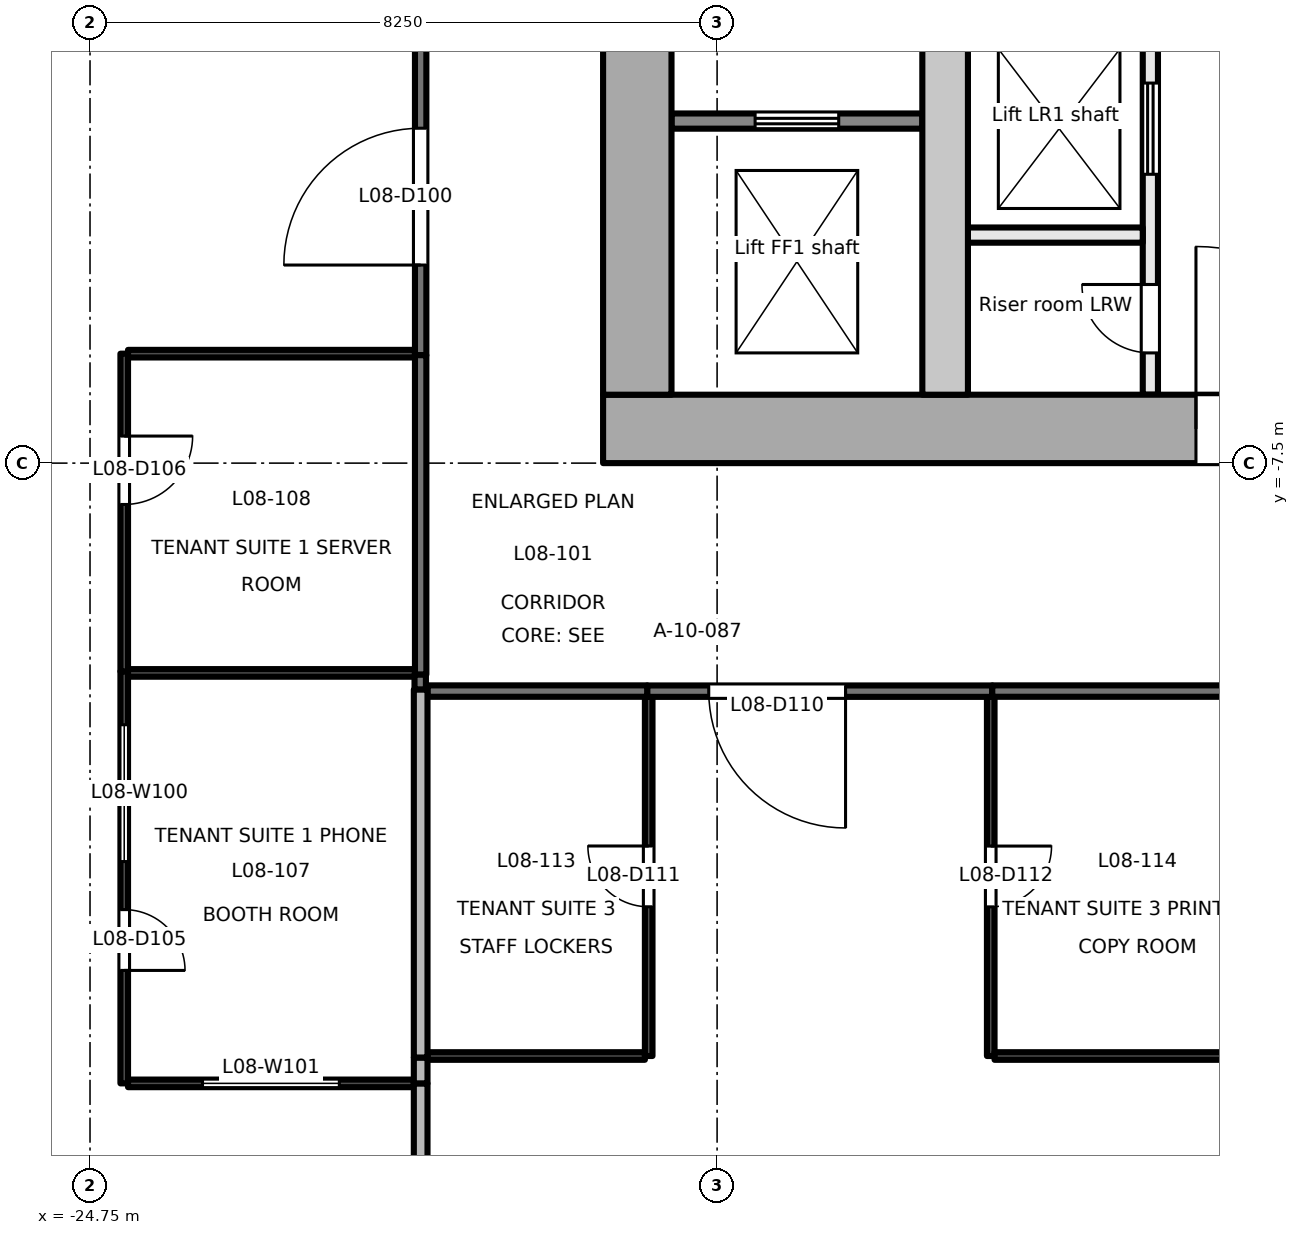
"""IFC4 building model, lengths in metres.
Left out: names, types, materials, properties, quantities, classifications, styles, units other than length and angle.
Written with IfcOpenShell. Run it as: python <this file> out.ifc"""

import sys

from ifc_helpers import new_model, si_unit, direction, frame, frame_2d, origin, place, context, subcontext, project, spatial, rectangle, extrude, element, fill, save


model = new_model("IFC4")
c1 = context("Model", 3, precision=1e-05, world=origin(), true_north=direction((0.0, 1.0)))
c2 = subcontext(c1, "Body", "Model", "MODEL_VIEW")
j1 = project(units=[si_unit("LENGTHUNIT", "METRE"), si_unit("PLANEANGLEUNIT", "RADIAN")], contexts=[c1])
p1 = place(None, origin())
s1 = spatial("IfcSite", under=j1, at=p1, CompositionType="ELEMENT")
p2 = place(p1, origin())
s2 = spatial("IfcBuilding", under=s1, at=p2, CompositionType="ELEMENT")
p3 = place(p2, frame((0.0, 0.0, 40.6)))
s3 = spatial("IfcBuildingStorey", under=s2, at=p3, CompositionType="ELEMENT", Elevation=40.6)
p4 = place(p3, frame((-18.0, -7.05, -0.2), z_axis=(0.0, 0.0, 1.0), x_axis=(1.0, 0.0, 0.0)))
e1 = element("IfcWall", 1, at=p4, inside=s3, PredefinedType="SHEAR", context=c2, shape_type="SweptSolid", body=[
    extrude(rectangle(XDim=36.0, YDim=0.9, at=frame_2d((18.0, 0.0))), origin(), (0.0, 0.0, 1.0), 4.1),
])
p5 = place(p4, frame((7.8, 0.0, 0.2)))
e2 = element("IfcOpeningElement", 2, at=p5, cuts=e1, PredefinedType="OPENING", context=c2, shape_type="SweptSolid", body=[
    extrude(rectangle(XDim=2.4, YDim=2.1, at=frame_2d((1.2, 1.05))), frame((0.0, 0.46, 0.0), z_axis=(0.0, -1.0, 0.0), x_axis=(1.0, 0.0, 0.0)), (0.0, 0.0, 1.0), 0.921),
])
p6 = place(p4, frame((17.4, 0.0, 0.2)))
e3 = element("IfcOpeningElement", 3, at=p6, cuts=e1, PredefinedType="OPENING", context=c2, shape_type="SweptSolid", body=[
    extrude(rectangle(XDim=1.2, YDim=2.1, at=frame_2d((0.6, 1.05))), frame((0.0, 0.46, 0.0), z_axis=(0.0, -1.0, 0.0), x_axis=(1.0, 0.0, 0.0)), (0.0, 0.0, 1.0), 0.921),
])
p7 = place(p4, frame((26.1, 0.0, 0.2)))
e4 = element("IfcOpeningElement", 4, at=p7, cuts=e1, PredefinedType="OPENING", context=c2, shape_type="SweptSolid", body=[
    extrude(rectangle(XDim=2.4, YDim=2.1, at=frame_2d((1.2, 1.05))), frame((0.0, 0.46, 0.0), z_axis=(0.0, -1.0, 0.0), x_axis=(1.0, 0.0, 0.0)), (0.0, 0.0, 1.0), 0.921),
])
p8 = place(p3, frame((-17.55, -6.6, -0.2), z_axis=(0.0, 0.0, 1.0), x_axis=(0.0, 1.0, 0.0)))
e5 = element("IfcWall", 5, at=p8, inside=s3, PredefinedType="SHEAR", context=c2, shape_type="SweptSolid", body=[
    extrude(rectangle(XDim=13.2, YDim=0.9, at=frame_2d((6.6, 0.0))), origin(), (0.0, 0.0, 1.0), 4.1),
])
p9 = place(p8, frame((4.55, 0.0, 0.2)))
e6 = element("IfcOpeningElement", 6, at=p9, cuts=e5, PredefinedType="OPENING", context=c2, shape_type="SweptSolid", body=[
    extrude(rectangle(XDim=1.2, YDim=2.1, at=frame_2d((0.6, 1.05))), frame((0.0, 0.46, 0.0), z_axis=(0.0, -1.0, 0.0), x_axis=(1.0, 0.0, 0.0)), (0.0, 0.0, 1.0), 0.921),
])
p10 = place(p3, frame((-13.5, -6.6, -0.2), z_axis=(0.0, 0.0, 1.0), x_axis=(0.0, 1.0, 0.0)))
e7 = element("IfcWall", 7, at=p10, inside=s3, PredefinedType="SHEAR", context=c2, shape_type="SweptSolid", body=[
    extrude(rectangle(XDim=13.2, YDim=0.6, at=frame_2d((6.6, 0.0))), origin(), (0.0, 0.0, 1.0), 4.1),
])
p11 = place(p3, frame((-17.1, -3.0, 0.0), z_axis=(0.0, 0.0, 1.0), x_axis=(1.0, 0.0, 0.0)))
e8 = element("IfcWall", 8, at=p11, inside=s3, PredefinedType="PARTITIONING", context=c2, shape_type="SweptSolid", body=[
    extrude(rectangle(XDim=3.3, YDim=0.2, at=frame_2d((1.65, 0.0))), origin(), (0.0, 0.0, 1.0), 3.9),
])
p12 = place(p11, frame((1.1, 0.0, 0.0)))
e9 = element("IfcOpeningElement", 9, at=p12, cuts=e8, PredefinedType="OPENING", context=c2, shape_type="SweptSolid", body=[
    extrude(rectangle(XDim=1.1, YDim=2.1, at=frame_2d((0.55, 1.05))), frame((0.0, 0.111, 0.0), z_axis=(0.0, -1.0, 0.0), x_axis=(1.0, 0.0, 0.0)), (0.0, 0.0, 1.0), 0.221),
])
p13 = place(p3, frame((-10.8, -6.6, 0.0), z_axis=(0.0, 0.0, 1.0), x_axis=(0.0, 1.0, 0.0)))
e10 = element("IfcWall", 10, at=p13, inside=s3, PredefinedType="PARTITIONING", context=c2, shape_type="SweptSolid", body=[
    extrude(rectangle(XDim=13.2, YDim=0.2, at=frame_2d((6.6, 0.0))), origin(), (0.0, 0.0, 1.0), 3.9),
])
p14 = place(p13, frame((0.55, 0.0, 0.0)))
e11 = element("IfcOpeningElement", 11, at=p14, cuts=e10, PredefinedType="OPENING", context=c2, shape_type="SweptSolid", body=[
    extrude(rectangle(XDim=0.9, YDim=2.1, at=frame_2d((0.45, 1.05))), frame((0.0, 0.111, 0.0), z_axis=(0.0, -1.0, 0.0), x_axis=(1.0, 0.0, 0.0)), (0.0, 0.0, 1.0), 0.221),
])
p15 = place(p13, frame((2.9, 0.0, 0.0)))
e12 = element("IfcOpeningElement", 12, at=p15, cuts=e10, PredefinedType="OPENING", context=c2, shape_type="SweptSolid", body=[
    extrude(rectangle(XDim=1.2, YDim=2.1, at=frame_2d((0.6, 1.05))), frame((0.0, 0.111, 0.0), z_axis=(0.0, -1.0, 0.0), x_axis=(1.0, 0.0, 0.0)), (0.0, 0.0, 1.0), 0.221),
])
p16 = place(p13, frame((5.7, 0.0, 0.0)))
e13 = element("IfcOpeningElement", 13, at=p16, cuts=e10, PredefinedType="OPENING", context=c2, shape_type="SweptSolid", body=[
    extrude(rectangle(XDim=1.2, YDim=2.1, at=frame_2d((0.6, 1.05))), frame((0.0, 0.111, 0.0), z_axis=(0.0, -1.0, 0.0), x_axis=(1.0, 0.0, 0.0)), (0.0, 0.0, 1.0), 0.221),
])
p17 = place(p13, frame((8.5, 0.0, 0.0)))
e14 = element("IfcOpeningElement", 14, at=p17, cuts=e10, PredefinedType="OPENING", context=c2, shape_type="SweptSolid", body=[
    extrude(rectangle(XDim=1.2, YDim=2.1, at=frame_2d((0.6, 1.05))), frame((0.0, 0.111, 0.0), z_axis=(0.0, -1.0, 0.0), x_axis=(1.0, 0.0, 0.0)), (0.0, 0.0, 1.0), 0.221),
])
p18 = place(p13, frame((11.3, 0.0, 0.0)))
e15 = element("IfcOpeningElement", 15, at=p18, cuts=e10, PredefinedType="OPENING", context=c2, shape_type="SweptSolid", body=[
    extrude(rectangle(XDim=1.2, YDim=2.1, at=frame_2d((0.6, 1.05))), frame((0.0, 0.111, 0.0), z_axis=(0.0, -1.0, 0.0), x_axis=(1.0, 0.0, 0.0)), (0.0, 0.0, 1.0), 0.221),
])
p19 = place(p3, frame((-13.2, -4.5, 0.0), z_axis=(0.0, 0.0, 1.0), x_axis=(1.0, 0.0, 0.0)))
e16 = element("IfcWall", 16, at=p19, inside=s3, PredefinedType="PARTITIONING", context=c2, shape_type="SweptSolid", body=[
    extrude(rectangle(XDim=2.3, YDim=0.2, at=frame_2d((1.15, 0.0))), origin(), (0.0, 0.0, 1.0), 3.9),
])
p20 = place(p3, frame((-20.4, -6.08, 0.0), z_axis=(0.0, 0.0, 1.0), x_axis=(0.0, 1.0, 0.0)))
e17 = element("IfcWall", 17, at=p20, inside=s3, PredefinedType="PARTITIONING", context=c2, shape_type="SweptSolid", body=[
    extrude(rectangle(XDim=4.172, YDim=0.15, at=frame_2d((2.086, 0.0))), origin(), (0.0, 0.0, 1.0), 3.3),
])
p21 = place(p20, frame((1.186, 0.0, 0.0)))
e18 = element("IfcOpeningElement", 18, at=p21, cuts=e17, PredefinedType="OPENING", context=c2, shape_type="SweptSolid", body=[
    extrude(rectangle(XDim=1.8, YDim=2.1, at=frame_2d((0.9, 1.05))), frame((0.0, 0.085, 0.0), z_axis=(0.0, -1.0, 0.0), x_axis=(1.0, 0.0, 0.0)), (0.0, 0.0, 1.0), 0.171),
])
p22 = place(p3, frame((-20.406, -10.48, 0.0), z_axis=(0.0, 0.0, 1.0), x_axis=(0.0, 1.0, 0.0)))
e19 = element("IfcWall", 19, at=p22, inside=s3, PredefinedType="PARTITIONING", context=c2, shape_type="SweptSolid", body=[
    extrude(rectangle(XDim=0.2, YDim=0.15, at=frame_2d((0.1, 0.0))), origin(), (0.0, 0.0, 1.0), 3.9),
])
p23 = place(p3, frame((-20.4, -10.28, 0.0), z_axis=(0.0, 0.0, 1.0), x_axis=(0.0, 1.0, 0.0)))
e20 = element("IfcWall", 20, at=p23, inside=s3, PredefinedType="PARTITIONING", context=c2, shape_type="SweptSolid", body=[
    extrude(rectangle(XDim=4.2, YDim=0.15, at=frame_2d((2.1, 0.0))), origin(), (0.0, 0.0, 1.0), 3.3),
])
p24 = place(p3, frame((-12.88, -10.5, 0.0), z_axis=(0.0, 0.0, 1.0), x_axis=(-1.0, 0.0, 0.0)))
e21 = element("IfcWall", 21, at=p24, inside=s3, PredefinedType="PARTITIONING", context=c2, shape_type="SweptSolid", body=[
    extrude(rectangle(XDim=4.54, YDim=0.15, at=frame_2d((2.27, 0.0))), origin(), (0.0, 0.0, 1.0), 2.9),
])
p25 = place(p24, frame((1.93, 0.0, 0.0)))
e22 = element("IfcOpeningElement", 22, at=p25, cuts=e21, PredefinedType="OPENING", context=c2, shape_type="SweptSolid", body=[
    extrude(rectangle(XDim=1.8, YDim=2.1, at=frame_2d((0.9, 1.05))), frame((0.0, 0.085, 0.0), z_axis=(0.0, -1.0, 0.0), x_axis=(1.0, 0.0, 0.0)), (0.0, 0.0, 1.0), 0.171),
])
p26 = place(p3, frame((-17.42, -10.499, 0.0), z_axis=(0.0, 0.0, 1.0), x_axis=(-1.0, 0.0, 0.0)))
e23 = element("IfcWall", 23, at=p26, inside=s3, PredefinedType="PARTITIONING", context=c2, shape_type="SweptSolid", body=[
    extrude(rectangle(XDim=2.89, YDim=0.15, at=frame_2d((1.445, 0.0))), origin(), (0.0, 0.0, 1.0), 2.5),
])
p27 = place(p3, frame((-9.09, -10.499, 0.0), z_axis=(0.0, 0.0, 1.0), x_axis=(-1.0, 0.0, 0.0)))
e24 = element("IfcWall", 24, at=p27, inside=s3, PredefinedType="PARTITIONING", context=c2, shape_type="SweptSolid", body=[
    extrude(rectangle(XDim=3.79, YDim=0.15, at=frame_2d((1.895, 0.0))), origin(), (0.0, 0.0, 1.0), 2.9),
])
p28 = place(p3, frame((-24.3, -10.24, 0.0), z_axis=(0.0, 0.0, 1.0), x_axis=(0.0, -1.0, 0.0)))
e25 = element("IfcWall", 25, at=p28, inside=s3, PredefinedType="PARTITIONING", context=c2, shape_type="SweptSolid", body=[
    extrude(rectangle(XDim=5.42, YDim=0.1, at=frame_2d((2.71, 0.0))), origin(), (0.0, 0.0, 1.0), 3.3),
])
p29 = place(p28, frame((3.134, 0.0, 0.0)))
e26 = element("IfcOpeningElement", 26, at=p29, cuts=e25, PredefinedType="OPENING", context=c2, shape_type="SweptSolid", body=[
    extrude(rectangle(XDim=0.8, YDim=2.1, at=frame_2d((0.4, 1.05))), frame((0.0, 0.061, 0.0), z_axis=(0.0, -1.0, 0.0), x_axis=(1.0, 0.0, 0.0)), (0.0, 0.0, 1.0), 0.121),
])
p30 = place(p28, frame((0.702, 0.0, 0.9)))
e27 = element("IfcOpeningElement", 27, at=p30, cuts=e25, PredefinedType="OPENING", context=c2, shape_type="SweptSolid", body=[
    extrude(rectangle(XDim=1.8, YDim=1.2, at=frame_2d((0.9, 0.6))), frame((0.0, 0.061, 0.0), z_axis=(0.0, -1.0, 0.0), x_axis=(1.0, 0.0, 0.0)), (0.0, 0.0, 1.0), 0.121),
])
p31 = place(p3, frame((-24.25, -15.66, 0.0), z_axis=(0.0, 0.0, 1.0), x_axis=(1.0, 0.0, 0.0)))
e28 = element("IfcWall", 28, at=p31, inside=s3, PredefinedType="PARTITIONING", context=c2, shape_type="SweptSolid", body=[
    extrude(rectangle(XDim=3.76, YDim=0.1, at=frame_2d((1.88, 0.0))), origin(), (0.0, 0.0, 1.0), 3.9),
])
p32 = place(p31, frame((0.98, 0.0, 0.9)))
e29 = element("IfcOpeningElement", 29, at=p32, cuts=e28, PredefinedType="OPENING", context=c2, shape_type="SweptSolid", body=[
    extrude(rectangle(XDim=1.8, YDim=1.2, at=frame_2d((0.9, 0.6))), frame((0.0, 0.061, 0.0), z_axis=(0.0, -1.0, 0.0), x_axis=(1.0, 0.0, 0.0)), (0.0, 0.0, 1.0), 0.121),
])
p33 = place(p3, frame((-24.3, -6.06, 0.0), z_axis=(0.0, 0.0, 1.0), x_axis=(0.0, -1.0, 0.0)))
e30 = element("IfcWall", 30, at=p33, inside=s3, PredefinedType="PARTITIONING", context=c2, shape_type="SweptSolid", body=[
    extrude(rectangle(XDim=4.18, YDim=0.1, at=frame_2d((2.09, 0.0))), origin(), (0.0, 0.0, 1.0), 3.3),
])
p34 = place(p33, frame((1.084, 0.0, 0.0)))
e31 = element("IfcOpeningElement", 31, at=p34, cuts=e30, PredefinedType="OPENING", context=c2, shape_type="SweptSolid", body=[
    extrude(rectangle(XDim=0.9, YDim=2.1, at=frame_2d((0.45, 1.05))), frame((0.0, 0.061, 0.0), z_axis=(0.0, -1.0, 0.0), x_axis=(1.0, 0.0, 0.0)), (0.0, 0.0, 1.0), 0.121),
])
p35 = place(p3, frame((-20.475, -6.06, 0.0), z_axis=(0.0, 0.0, 1.0), x_axis=(-1.0, 0.0, 0.0)))
e32 = element("IfcWall", 32, at=p35, inside=s3, PredefinedType="PARTITIONING", context=c2, shape_type="SweptSolid", body=[
    extrude(rectangle(XDim=3.775, YDim=0.1, at=frame_2d((1.887, 0.0))), origin(), (0.0, 0.0, 1.0), 3.9),
])
p36 = place(p3, frame((-20.4, -15.66, 0.0), z_axis=(0.0, 0.0, 1.0), x_axis=(0.0, -1.0, 0.0)))
e33 = element("IfcWall", 33, at=p36, inside=s3, PredefinedType="PARTITIONING", context=c2, shape_type="SweptSolid", body=[
    extrude(rectangle(XDim=6.0, YDim=0.18, at=frame_2d((3.0, 0.0))), origin(), (0.0, 0.0, 1.0), 3.3),
])
p37 = place(p3, frame((-24.25, -10.26, 0.0), z_axis=(0.0, 0.0, 1.0), x_axis=(1.0, 0.0, 0.0)))
e34 = element("IfcWall", 34, at=p37, inside=s3, PredefinedType="PARTITIONING", context=c2, shape_type="SweptSolid", body=[
    extrude(rectangle(XDim=3.775, YDim=0.1, at=frame_2d((1.887, 0.0))), origin(), (0.0, 0.0, 1.0), 3.9),
])
p38 = place(p3, frame((-20.4, -15.32, 0.0), z_axis=(0.0, 0.0, 1.0), x_axis=(0.0, -1.0, 0.0)))
e35 = element("IfcWall", 35, at=p38, inside=s3, PredefinedType="PARTITIONING", context=c2, shape_type="SweptSolid", body=[
    extrude(rectangle(XDim=0.34, YDim=0.18, at=frame_2d((0.17, 0.0))), origin(), (0.0, 0.0, 1.0), 3.9),
])
p39 = place(p3, frame((-20.4, -10.48, 0.0), z_axis=(0.0, 0.0, 1.0), x_axis=(0.0, -1.0, 0.0)))
e36 = element("IfcWall", 36, at=p39, inside=s3, PredefinedType="PARTITIONING", context=c2, shape_type="SweptSolid", body=[
    extrude(rectangle(XDim=4.84, YDim=0.18, at=frame_2d((2.42, 0.0))), origin(), (0.0, 0.0, 1.0), 3.3),
])
p40 = place(p3, frame((-20.31, -15.3, 0.0), z_axis=(0.0, 0.0, 1.0), x_axis=(1.0, 0.0, 0.0)))
e37 = element("IfcWall", 37, at=p40, inside=s3, PredefinedType="PARTITIONING", context=c2, shape_type="SweptSolid", body=[
    extrude(rectangle(XDim=2.86, YDim=0.1, at=frame_2d((1.43, 0.0))), origin(), (0.0, 0.0, 1.0), 2.5),
])
p41 = place(p3, frame((-17.4, -15.3, 0.0), z_axis=(0.0, 0.0, 1.0), x_axis=(0.0, 1.0, 0.0)))
e38 = element("IfcWall", 38, at=p41, inside=s3, PredefinedType="PARTITIONING", context=c2, shape_type="SweptSolid", body=[
    extrude(rectangle(XDim=4.725, YDim=0.1, at=frame_2d((2.363, 0.0))), origin(), (0.0, 0.0, 1.0), 3.9),
])
p42 = place(p41, frame((1.963, 0.0, 0.0)))
e39 = element("IfcOpeningElement", 39, at=p42, cuts=e38, PredefinedType="OPENING", context=c2, shape_type="SweptSolid", body=[
    extrude(rectangle(XDim=0.8, YDim=2.1, at=frame_2d((0.4, 1.05))), frame((0.0, 0.061, 0.0), z_axis=(0.0, -1.0, 0.0), x_axis=(1.0, 0.0, 0.0)), (0.0, 0.0, 1.0), 0.121),
])
p43 = place(p3, frame((-12.9, -10.575, 0.0), z_axis=(0.0, 0.0, 1.0), x_axis=(0.0, -1.0, 0.0)))
e40 = element("IfcWall", 40, at=p43, inside=s3, PredefinedType="PARTITIONING", context=c2, shape_type="SweptSolid", body=[
    extrude(rectangle(XDim=4.725, YDim=0.1, at=frame_2d((2.363, 0.0))), origin(), (0.0, 0.0, 1.0), 3.9),
])
p44 = place(p43, frame((1.963, 0.0, 0.0)))
e41 = element("IfcOpeningElement", 41, at=p44, cuts=e40, PredefinedType="OPENING", context=c2, shape_type="SweptSolid", body=[
    extrude(rectangle(XDim=0.8, YDim=2.1, at=frame_2d((0.4, 1.05))), frame((0.0, 0.061, 0.0), z_axis=(0.0, -1.0, 0.0), x_axis=(1.0, 0.0, 0.0)), (0.0, 0.0, 1.0), 0.121),
])
p45 = place(p3, frame((-12.85, -15.3, 0.0), z_axis=(0.0, 0.0, 1.0), x_axis=(1.0, 0.0, 0.0)))
e42 = element("IfcWall", 42, at=p45, inside=s3, PredefinedType="PARTITIONING", context=c2, shape_type="SweptSolid", body=[
    extrude(rectangle(XDim=3.76, YDim=0.1, at=frame_2d((1.88, 0.0))), origin(), (0.0, 0.0, 1.0), 2.9),
])
p46 = place(p12, origin())
e43 = element("IfcDoor", 43, at=p46, inside=s3, OperationType="DOUBLE_DOOR_SLIDING", PredefinedType="DOOR", context=c2, shape_type="SweptSolid", body=[
    extrude(rectangle(XDim=1.1, YDim=2.1, at=frame_2d((0.55, 1.05))), frame((0.0, 0.025, 0.0), z_axis=(0.0, -1.0, 0.0), x_axis=(1.0, 0.0, 0.0)), (0.0, 0.0, 1.0), 0.05),
])
fill(e9, e43)
p47 = place(p14, origin())
e44 = element("IfcDoor", 44, at=p47, inside=s3, OperationType="SINGLE_SWING_RIGHT", PredefinedType="DOOR", context=c2, shape_type="SweptSolid", body=[
    extrude(rectangle(XDim=0.9, YDim=2.1, at=frame_2d((0.45, 1.05))), frame((0.0, 0.025, 0.0), z_axis=(0.0, -1.0, 0.0), x_axis=(1.0, 0.0, 0.0)), (0.0, 0.0, 1.0), 0.05),
])
fill(e11, e44)
p48 = place(p15, origin())
e45 = element("IfcDoor", 45, at=p48, inside=s3, OperationType="DOUBLE_DOOR_SLIDING", PredefinedType="DOOR", context=c2, shape_type="SweptSolid", body=[
    extrude(rectangle(XDim=1.2, YDim=2.1, at=frame_2d((0.6, 1.05))), frame((0.0, 0.025, 0.0), z_axis=(0.0, -1.0, 0.0), x_axis=(1.0, 0.0, 0.0)), (0.0, 0.0, 1.0), 0.05),
])
fill(e12, e45)
p49 = place(p5, origin())
e46 = element("IfcDoor", 46, at=p49, inside=s3, OperationType="DOUBLE_DOOR_DOUBLE_SWING", PredefinedType="DOOR", context=c2, shape_type="SweptSolid", body=[
    extrude(rectangle(XDim=2.4, YDim=2.1, at=frame_2d((1.2, 1.05))), frame((0.0, 0.025, 0.0), z_axis=(0.0, -1.0, 0.0), x_axis=(1.0, 0.0, 0.0)), (0.0, 0.0, 1.0), 0.05),
])
fill(e2, e46)
p50 = place(p21, origin())
e47 = element("IfcDoor", 47, at=p50, inside=s3, OperationType="DOUBLE_DOOR_SINGLE_SWING", PredefinedType="DOOR", context=c2, shape_type="SweptSolid", body=[
    extrude(rectangle(XDim=1.8, YDim=2.1, at=frame_2d((0.9, 1.05))), frame((0.0, 0.025, 0.0), z_axis=(0.0, -1.0, 0.0), x_axis=(1.0, 0.0, 0.0)), (0.0, 0.0, 1.0), 0.05),
])
fill(e18, e47)
p51 = place(p29, origin())
e48 = element("IfcDoor", 48, at=p51, inside=s3, OperationType="SINGLE_SWING_RIGHT", PredefinedType="DOOR", context=c2, shape_type="SweptSolid", body=[
    extrude(rectangle(XDim=0.8, YDim=2.1, at=frame_2d((0.4, 1.05))), frame((0.0, 0.025, 0.0), z_axis=(0.0, -1.0, 0.0), x_axis=(1.0, 0.0, 0.0)), (0.0, 0.0, 1.0), 0.05),
])
fill(e26, e48)
p52 = place(p34, origin())
e49 = element("IfcDoor", 49, at=p52, inside=s3, OperationType="SINGLE_SWING_LEFT", PredefinedType="DOOR", context=c2, shape_type="SweptSolid", body=[
    extrude(rectangle(XDim=0.9, YDim=2.1, at=frame_2d((0.45, 1.05))), frame((0.0, 0.025, 0.0), z_axis=(0.0, -1.0, 0.0), x_axis=(1.0, 0.0, 0.0)), (0.0, 0.0, 1.0), 0.05),
])
fill(e31, e49)
p53 = place(p25, origin())
e50 = element("IfcDoor", 50, at=p53, inside=s3, OperationType="DOUBLE_DOOR_SINGLE_SWING", PredefinedType="DOOR", context=c2, shape_type="SweptSolid", body=[
    extrude(rectangle(XDim=1.8, YDim=2.1, at=frame_2d((0.9, 1.05))), frame((0.0, 0.025, 0.0), z_axis=(0.0, -1.0, 0.0), x_axis=(1.0, 0.0, 0.0)), (0.0, 0.0, 1.0), 0.05),
])
fill(e22, e50)
p54 = place(p42, origin())
e51 = element("IfcDoor", 51, at=p54, inside=s3, OperationType="SINGLE_SWING_RIGHT", PredefinedType="DOOR", context=c2, shape_type="SweptSolid", body=[
    extrude(rectangle(XDim=0.8, YDim=2.1, at=frame_2d((0.4, 1.05))), frame((0.0, 0.025, 0.0), z_axis=(0.0, -1.0, 0.0), x_axis=(1.0, 0.0, 0.0)), (0.0, 0.0, 1.0), 0.05),
])
fill(e39, e51)
p55 = place(p44, origin())
e52 = element("IfcDoor", 52, at=p55, inside=s3, OperationType="SINGLE_SWING_LEFT", PredefinedType="DOOR", context=c2, shape_type="SweptSolid", body=[
    extrude(rectangle(XDim=0.8, YDim=2.1, at=frame_2d((0.4, 1.05))), frame((0.0, 0.025, 0.0), z_axis=(0.0, -1.0, 0.0), x_axis=(1.0, 0.0, 0.0)), (0.0, 0.0, 1.0), 0.05),
])
fill(e41, e52)
p56 = place(p30, origin())
e53 = element("IfcWindow", 53, at=p56, inside=s3, PartitioningType="SINGLE_PANEL", PredefinedType="WINDOW", context=c2, shape_type="SweptSolid", body=[
    extrude(rectangle(XDim=1.8, YDim=1.2, at=frame_2d((0.9, 0.6))), frame((0.0, 0.03, 0.0), z_axis=(0.0, -1.0, 0.0), x_axis=(1.0, 0.0, 0.0)), (0.0, 0.0, 1.0), 0.06),
])
fill(e27, e53)
p57 = place(p32, origin())
e54 = element("IfcWindow", 54, at=p57, inside=s3, PartitioningType="SINGLE_PANEL", PredefinedType="WINDOW", context=c2, shape_type="SweptSolid", body=[
    extrude(rectangle(XDim=1.8, YDim=1.2, at=frame_2d((0.9, 0.6))), frame((0.0, 0.03, 0.0), z_axis=(0.0, -1.0, 0.0), x_axis=(1.0, 0.0, 0.0)), (0.0, 0.0, 1.0), 0.06),
])
fill(e29, e54)
save(model, sys.argv[1])
